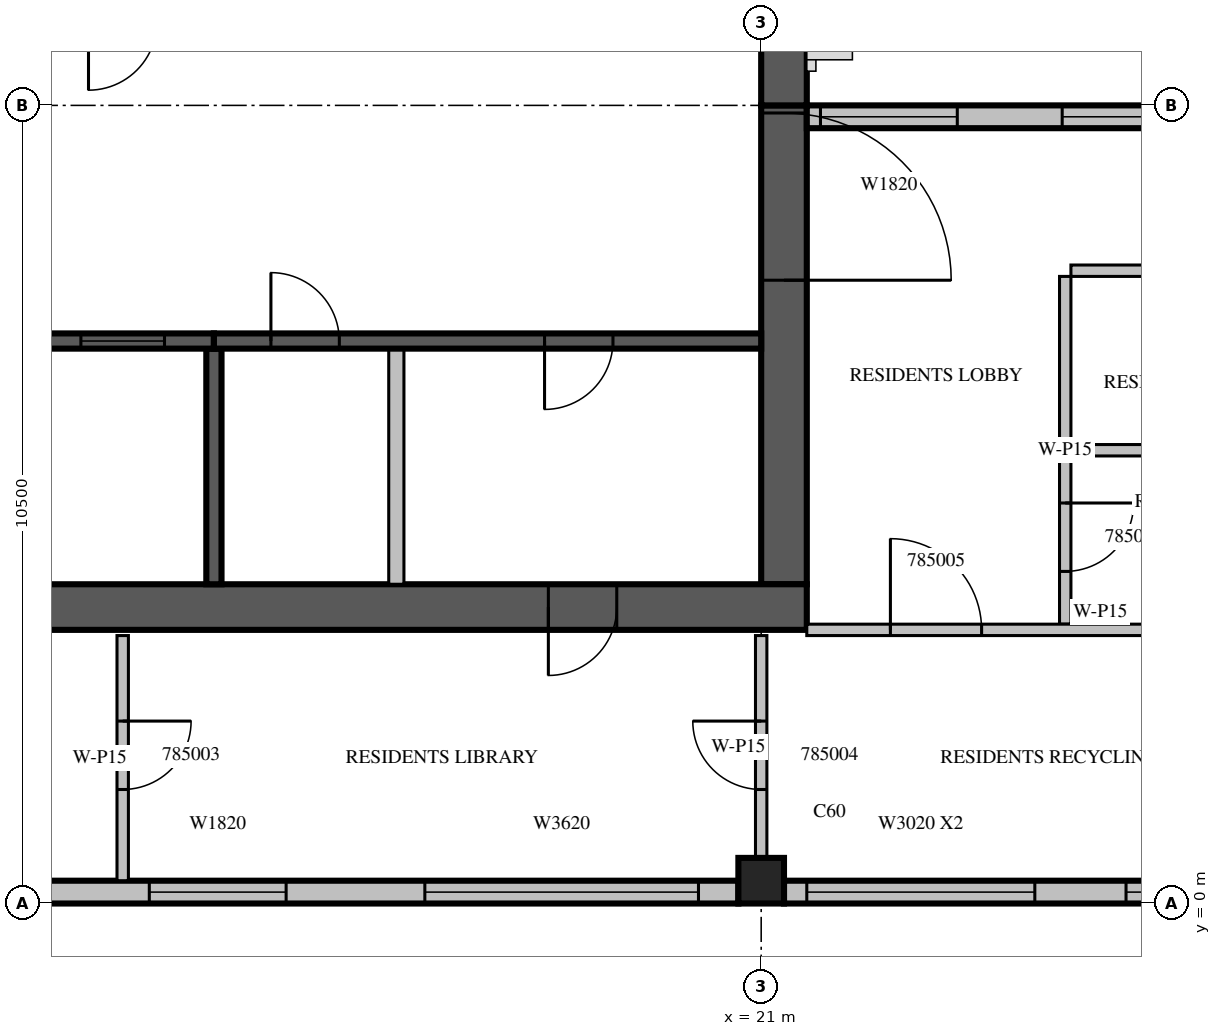
"""IFC4 building model, lengths in metres.
Left out: names, types, materials, properties, quantities, classifications, styles, units other than length and angle.
Written with IfcOpenShell. Run it as: python <this file> out.ifc"""

import sys

from ifc_helpers import new_model, si_unit, direction, frame, frame_2d, origin, origin_2d, place, context, subcontext, project, spatial, rectangle, extrude, source, transform, mapped, element, fill, save


model = new_model("IFC4")
c1 = context("Model", 3, precision=1e-05, world=origin(), true_north=direction((0.0, 1.0)))
c2 = subcontext(c1, "Body", "Model", "MODEL_VIEW")
j1 = project(units=[si_unit("LENGTHUNIT", "METRE"), si_unit("PLANEANGLEUNIT", "RADIAN")], contexts=[c1])
p1 = place(None, origin())
s1 = spatial("IfcSite", under=j1, at=p1, CompositionType="ELEMENT")
p2 = place(p1, origin())
s2 = spatial("IfcBuilding", under=s1, at=p2, CompositionType="ELEMENT")
p3 = place(p2, frame((0.0, 0.0, 358.0)))
s3 = spatial("IfcBuildingStorey", under=s2, at=p3, CompositionType="ELEMENT", Elevation=358.0)
m1 = source(origin(), c2, "Body", "SweptSolid", [
    extrude(rectangle(XDim=0.6, YDim=0.6, at=origin_2d()), origin(), (0.0, 0.0, 1.0), 3.5),
])
p4 = place(p3, frame((21.0, 0.3, 0.0), z_axis=(0.0, 0.0, 1.0), x_axis=(1.0, 0.0, 0.0)))
e1 = element("IfcColumn", 1, at=p4, inside=s3, PredefinedType="COLUMN", context=c2, shape_type="MappedRepresentation", body=[
    mapped(m1, transform((0.0, 0.0, 0.0), scale=1.0)),
])
m2 = source(origin(), c2, "Body", "SweptSolid", [
    extrude(rectangle(XDim=6.3, YDim=0.6, at=frame_2d((3.15, 0.0))), origin(), (0.0, 0.0, 1.0), 3.5),
])
p5 = place(p3, frame((21.3, 4.2, 0.0), z_axis=(0.0, 0.0, 1.0), x_axis=(0.0, 1.0, 0.0)))
e2 = element("IfcWall", 2, at=p5, inside=s3, PredefinedType="SHEAR", context=c2, shape_type="MappedRepresentation", body=[
    mapped(m2, transform((0.0, 0.0, 0.0), scale=1.0)),
])
m3 = source(origin(), c2, "Body", "SweptSolid", [
    extrude(rectangle(XDim=2.2, YDim=2.1, at=frame_2d((1.1, 1.05))), frame((0.0, 0.31, 0.0), z_axis=(0.0, -1.0, 0.0), x_axis=(1.0, 0.0, 0.0)), (0.0, 0.0, 1.0), 0.62),
])
p6 = place(p5, frame((4.0, 0.0, 0.0)))
e3 = element("IfcOpeningElement", 3, at=p6, cuts=e2, PredefinedType="OPENING", context=c2, shape_type="MappedRepresentation", body=[
    mapped(m3, transform((0.0, 0.0, 0.0), scale=1.0)),
])
m4 = source(origin(), c2, "Body", "SweptSolid", [
    extrude(rectangle(XDim=17.4, YDim=0.6, at=frame_2d((8.7, 0.0))), origin(), (0.0, 0.0, 1.0), 3.5),
])
p7 = place(p3, frame((4.2, 3.9, 0.0), z_axis=(0.0, 0.0, 1.0), x_axis=(1.0, 0.0, 0.0)))
e4 = element("IfcWall", 4, at=p7, inside=s3, PredefinedType="SHEAR", context=c2, shape_type="MappedRepresentation", body=[
    mapped(m4, transform((0.0, 0.0, 0.0), scale=1.0)),
])
m5 = source(origin(), c2, "Body", "SweptSolid", [
    extrude(rectangle(XDim=0.9, YDim=2.1, at=frame_2d((0.45, 1.05))), frame((0.0, 0.31, 0.0), z_axis=(0.0, -1.0, 0.0), x_axis=(1.0, 0.0, 0.0)), (0.0, 0.0, 1.0), 0.62),
])
p8 = place(p7, frame((14.0, 0.0, 0.0)))
e5 = element("IfcOpeningElement", 5, at=p8, cuts=e4, PredefinedType="OPENING", context=c2, shape_type="MappedRepresentation", body=[
    mapped(m5, transform((0.0, 0.0, 0.0), scale=1.0)),
])
m6 = source(origin(), c2, "Body", "SweptSolid", [
    extrude(rectangle(XDim=10.5, YDim=0.6, at=frame_2d((5.25, 0.0))), origin(), (0.0, 0.0, 1.0), 3.5),
])
p9 = place(p3, frame((21.3, 10.5, 0.0), z_axis=(0.0, 0.0, 1.0), x_axis=(0.0, 1.0, 0.0)))
e6 = element("IfcWall", 6, at=p9, inside=s3, PredefinedType="SHEAR", context=c2, shape_type="MappedRepresentation", body=[
    mapped(m6, transform((0.0, 0.0, 0.0), scale=1.0)),
])
m7 = source(origin(), c2, "Body", "SweptSolid", [
    extrude(rectangle(XDim=1.2, YDim=2.4, at=frame_2d((0.6, 1.2))), frame((0.0, 0.31, 0.0), z_axis=(0.0, -1.0, 0.0), x_axis=(1.0, 0.0, 0.0)), (0.0, 0.0, 1.0), 0.62),
])
p10 = place(p9, frame((5.7, 0.0, 0.6)))
e7 = element("IfcOpeningElement", 7, at=p10, cuts=e6, PredefinedType="OPENING", context=c2, shape_type="MappedRepresentation", body=[
    mapped(m7, transform((0.0, 0.0, 0.0), scale=1.0)),
])
m8 = source(origin(), c2, "Body", "SweptSolid", [
    extrude(rectangle(XDim=9.9, YDim=0.3, at=frame_2d((4.95, 0.0))), origin(), (0.0, 0.0, 1.0), 3.1),
])
p11 = place(p3, frame((10.8, 0.15, 0.0), z_axis=(0.0, 0.0, 1.0), x_axis=(1.0, 0.0, 0.0)))
e8 = element("IfcWall", 8, at=p11, inside=s3, PredefinedType="STANDARD", context=c2, shape_type="MappedRepresentation", body=[
    mapped(m8, transform((0.0, 0.0, 0.0), scale=1.0)),
])
m9 = source(origin(), c2, "Body", "SweptSolid", [
    extrude(rectangle(XDim=1.8, YDim=2.0, at=frame_2d((0.9, 1.0))), frame((0.0, 0.16, 0.0), z_axis=(0.0, -1.0, 0.0), x_axis=(1.0, 0.0, 0.0)), (0.0, 0.0, 1.0), 0.32),
])
p12 = place(p11, frame((2.15, 0.0, 0.6)))
e9 = element("IfcOpeningElement", 9, at=p12, cuts=e8, PredefinedType="OPENING", context=c2, shape_type="MappedRepresentation", body=[
    mapped(m9, transform((0.0, 0.0, 0.0), scale=1.0)),
])
m10 = source(origin(), c2, "Body", "SweptSolid", [
    extrude(rectangle(XDim=3.6, YDim=2.0, at=frame_2d((1.8, 1.0))), frame((0.0, 0.16, 0.0), z_axis=(0.0, -1.0, 0.0), x_axis=(1.0, 0.0, 0.0)), (0.0, 0.0, 1.0), 0.32),
])
p13 = place(p11, frame((5.775, 0.0, 0.6)))
e10 = element("IfcOpeningElement", 10, at=p13, cuts=e8, PredefinedType="OPENING", context=c2, shape_type="MappedRepresentation", body=[
    mapped(m10, transform((0.0, 0.0, 0.0), scale=1.0)),
])
m11 = source(origin(), c2, "Body", "SweptSolid", [
    extrude(rectangle(XDim=7.8, YDim=0.3, at=frame_2d((3.9, 0.0))), origin(), (0.0, 0.0, 1.0), 3.1),
])
p14 = place(p3, frame((21.3, 0.15, 0.0), z_axis=(0.0, 0.0, 1.0), x_axis=(1.0, 0.0, 0.0)))
e11 = element("IfcWall", 11, at=p14, inside=s3, PredefinedType="STANDARD", context=c2, shape_type="MappedRepresentation", body=[
    mapped(m11, transform((0.0, 0.0, 0.0), scale=1.0)),
])
m12 = source(origin(), c2, "Body", "SweptSolid", [
    extrude(rectangle(XDim=3.0, YDim=2.0, at=frame_2d((1.5, 1.0))), frame((0.0, 0.16, 0.0), z_axis=(0.0, -1.0, 0.0), x_axis=(1.0, 0.0, 0.0)), (0.0, 0.0, 1.0), 0.32),
])
p15 = place(p14, frame((0.3, 0.0, 0.6)))
e12 = element("IfcOpeningElement", 12, at=p15, cuts=e11, PredefinedType="OPENING", context=c2, shape_type="MappedRepresentation", body=[
    mapped(m12, transform((0.0, 0.0, 0.0), scale=1.0)),
])
p16 = place(p14, frame((4.5, 0.0, 0.6)))
e13 = element("IfcOpeningElement", 13, at=p16, cuts=e11, PredefinedType="OPENING", context=c2, shape_type="MappedRepresentation", body=[
    mapped(m12, transform((0.0, 0.0, 0.0), scale=1.0)),
])
m13 = source(origin(), c2, "Body", "SweptSolid", [
    extrude(rectangle(XDim=7.5, YDim=0.3, at=frame_2d((3.75, 0.0))), origin(), (0.0, 0.0, 1.0), 3.1),
])
p17 = place(p3, frame((29.1, 10.35, 0.0), z_axis=(0.0, 0.0, 1.0), x_axis=(-1.0, 0.0, 0.0)))
e14 = element("IfcWall", 14, at=p17, inside=s3, PredefinedType="STANDARD", context=c2, shape_type="MappedRepresentation", body=[
    mapped(m13, transform((0.0, 0.0, 0.0), scale=1.0)),
])
p18 = place(p17, frame((1.14, 0.0, 0.6)))
e15 = element("IfcOpeningElement", 15, at=p18, cuts=e14, PredefinedType="OPENING", context=c2, shape_type="MappedRepresentation", body=[
    mapped(m12, transform((0.0, 0.0, 0.0), scale=1.0)),
])
p19 = place(p17, frame((5.52, 0.0, 0.6)))
e16 = element("IfcOpeningElement", 16, at=p19, cuts=e14, PredefinedType="OPENING", context=c2, shape_type="MappedRepresentation", body=[
    mapped(m9, transform((0.0, 0.0, 0.0), scale=1.0)),
])
m14 = source(origin(), c2, "Body", "SweptSolid", [
    extrude(rectangle(XDim=3.1, YDim=0.2, at=frame_2d((1.55, 0.0))), origin(), (0.0, 0.0, 1.0), 3.1),
])
p20 = place(p3, frame((13.8, 4.2, 0.0), z_axis=(0.0, 0.0, 1.0), x_axis=(0.0, 1.0, 0.0)))
e17 = element("IfcWall", 17, at=p20, inside=s3, PredefinedType="SOLIDWALL", context=c2, shape_type="MappedRepresentation", body=[
    mapped(m14, transform((0.0, 0.0, 0.0), scale=1.0)),
])
m15 = source(origin(), c2, "Body", "SweptSolid", [
    extrude(rectangle(XDim=3.1, YDim=0.2, at=frame_2d((1.55, 0.0))), origin(), (0.0, 0.0, 1.0), 3.1),
])
p21 = place(p3, frame((16.2, 4.2, 0.0), z_axis=(0.0, 0.0, 1.0), x_axis=(0.0, 1.0, 0.0)))
e18 = element("IfcWall", 18, at=p21, inside=s3, PredefinedType="PARTITIONING", context=c2, shape_type="MappedRepresentation", body=[
    mapped(m15, transform((0.0, 0.0, 0.0), scale=1.0)),
])
m16 = source(origin(), c2, "Body", "SweptSolid", [
    extrude(rectangle(XDim=9.6, YDim=0.2, at=frame_2d((4.8, 0.0))), origin(), (0.0, 0.0, 1.0), 3.5),
])
p22 = place(p3, frame((4.2, 7.4, 0.0), z_axis=(0.0, 0.0, 1.0), x_axis=(1.0, 0.0, 0.0)))
e19 = element("IfcWall", 19, at=p22, inside=s3, PredefinedType="SOLIDWALL", context=c2, shape_type="MappedRepresentation", body=[
    mapped(m16, transform((0.0, 0.0, 0.0), scale=1.0)),
])
m17 = source(origin(), c2, "Body", "SweptSolid", [
    extrude(rectangle(XDim=1.1, YDim=2.1, at=frame_2d((0.55, 1.05))), frame((0.0, 0.11, 0.0), z_axis=(0.0, -1.0, 0.0), x_axis=(1.0, 0.0, 0.0)), (0.0, 0.0, 1.0), 0.22),
])
p23 = place(p22, frame((0.65, 0.0, 0.0)))
e20 = element("IfcOpeningElement", 20, at=p23, cuts=e19, PredefinedType="OPENING", context=c2, shape_type="MappedRepresentation", body=[
    mapped(m17, transform((0.0, 0.0, 0.0), scale=1.0)),
])
p24 = place(p22, frame((3.05, 0.0, 0.0)))
e21 = element("IfcOpeningElement", 21, at=p24, cuts=e19, PredefinedType="OPENING", context=c2, shape_type="MappedRepresentation", body=[
    mapped(m17, transform((0.0, 0.0, 0.0), scale=1.0)),
])
p25 = place(p22, frame((5.45, 0.0, 0.0)))
e22 = element("IfcOpeningElement", 22, at=p25, cuts=e19, PredefinedType="OPENING", context=c2, shape_type="MappedRepresentation", body=[
    mapped(m17, transform((0.0, 0.0, 0.0), scale=1.0)),
])
p26 = place(p22, frame((7.85, 0.0, 0.0)))
e23 = element("IfcOpeningElement", 23, at=p26, cuts=e19, PredefinedType="OPENING", context=c2, shape_type="MappedRepresentation", body=[
    mapped(m17, transform((0.0, 0.0, 0.0), scale=1.0)),
])
m18 = source(origin(), c2, "Body", "SweptSolid", [
    extrude(rectangle(XDim=7.2, YDim=0.2, at=frame_2d((3.6, 0.0))), origin(), (0.0, 0.0, 1.0), 3.1),
])
p27 = place(p3, frame((13.8, 7.4, 0.0), z_axis=(0.0, 0.0, 1.0), x_axis=(1.0, 0.0, 0.0)))
e24 = element("IfcWall", 24, at=p27, inside=s3, PredefinedType="SOLIDWALL", context=c2, shape_type="MappedRepresentation", body=[
    mapped(m18, transform((0.0, 0.0, 0.0), scale=1.0)),
])
m19 = source(origin(), c2, "Body", "SweptSolid", [
    extrude(rectangle(XDim=0.9, YDim=2.1, at=frame_2d((0.45, 1.05))), frame((0.0, 0.11, 0.0), z_axis=(0.0, -1.0, 0.0), x_axis=(1.0, 0.0, 0.0)), (0.0, 0.0, 1.0), 0.22),
])
p28 = place(p27, frame((0.75, 0.0, 0.0)))
e25 = element("IfcOpeningElement", 25, at=p28, cuts=e24, PredefinedType="OPENING", context=c2, shape_type="MappedRepresentation", body=[
    mapped(m19, transform((0.0, 0.0, 0.0), scale=1.0)),
])
p29 = place(p27, frame((4.35, 0.0, 0.0)))
e26 = element("IfcOpeningElement", 26, at=p29, cuts=e24, PredefinedType="OPENING", context=c2, shape_type="MappedRepresentation", body=[
    mapped(m19, transform((0.0, 0.0, 0.0), scale=1.0)),
])
m20 = source(origin(), c2, "Body", "SweptSolid", [
    extrude(rectangle(XDim=4.575, YDim=0.15, at=frame_2d((2.288, 0.0))), origin(), (0.0, 0.0, 1.0), 3.1),
])
p30 = place(p3, frame((25.0, 8.25, 0.0), z_axis=(0.0, 0.0, 1.0), x_axis=(0.0, -1.0, 0.0)))
e27 = element("IfcWall", 27, at=p30, inside=s3, PredefinedType="PARTITIONING", context=c2, shape_type="MappedRepresentation", body=[
    mapped(m20, transform((0.0, 0.0, 0.0), scale=1.0)),
])
m21 = source(origin(), c2, "Body", "SweptSolid", [
    extrude(rectangle(XDim=0.9, YDim=2.1, at=frame_2d((0.45, 1.05))), frame((0.0, 0.085, 0.0), z_axis=(0.0, -1.0, 0.0), x_axis=(1.0, 0.0, 0.0)), (0.0, 0.0, 1.0), 0.17),
])
p31 = place(p30, frame((2.981, 0.0, 0.0)))
e28 = element("IfcOpeningElement", 28, at=p31, cuts=e27, PredefinedType="OPENING", context=c2, shape_type="MappedRepresentation", body=[
    mapped(m21, transform((0.0, 0.0, 0.0), scale=1.0)),
])
m22 = source(origin(), c2, "Body", "SweptSolid", [
    extrude(rectangle(XDim=4.25, YDim=0.15, at=frame_2d((2.125, 0.0))), origin(), (0.0, 0.0, 1.0), 3.1),
])
p32 = place(p3, frame((29.325, 8.325, 0.0), z_axis=(0.0, 0.0, 1.0), x_axis=(-1.0, 0.0, 0.0)))
e29 = element("IfcWall", 29, at=p32, inside=s3, PredefinedType="PARTITIONING", context=c2, shape_type="MappedRepresentation", body=[
    mapped(m22, transform((0.0, 0.0, 0.0), scale=1.0)),
])
m23 = source(origin(), c2, "Body", "SweptSolid", [
    extrude(rectangle(XDim=1.0, YDim=2.1, at=frame_2d((0.5, 1.05))), frame((0.0, 0.085, 0.0), z_axis=(0.0, -1.0, 0.0), x_axis=(1.0, 0.0, 0.0)), (0.0, 0.0, 1.0), 0.17),
])
p33 = place(p32, frame((1.625, 0.0, 0.0)))
e30 = element("IfcOpeningElement", 30, at=p33, cuts=e29, PredefinedType="OPENING", context=c2, shape_type="MappedRepresentation", body=[
    mapped(m23, transform((0.0, 0.0, 0.0), scale=1.0)),
])
p34 = place(p3, frame((29.325, 5.963, 0.0), z_axis=(0.0, 0.0, 1.0), x_axis=(-1.0, 0.0, 0.0)))
e31 = element("IfcWall", 31, at=p34, inside=s3, PredefinedType="PARTITIONING", context=c2, shape_type="MappedRepresentation", body=[
    mapped(m22, transform((0.0, 0.0, 0.0), scale=1.0)),
])
m24 = source(origin(), c2, "Body", "SweptSolid", [
    extrude(rectangle(XDim=3.225, YDim=0.15, at=frame_2d((1.613, 0.0))), origin(), (0.0, 0.0, 1.0), 3.1),
])
p35 = place(p3, frame((12.6, 3.525, 0.0), z_axis=(0.0, 0.0, 1.0), x_axis=(0.0, -1.0, 0.0)))
e32 = element("IfcWall", 32, at=p35, inside=s3, PredefinedType="PARTITIONING", context=c2, shape_type="MappedRepresentation", body=[
    mapped(m24, transform((0.0, 0.0, 0.0), scale=1.0)),
])
p36 = place(p35, frame((1.125, 0.0, 0.0)))
e33 = element("IfcOpeningElement", 33, at=p36, cuts=e32, PredefinedType="OPENING", context=c2, shape_type="MappedRepresentation", body=[
    mapped(m21, transform((0.0, 0.0, 0.0), scale=1.0)),
])
p37 = place(p3, frame((21.0, 3.525, 0.0), z_axis=(0.0, 0.0, 1.0), x_axis=(0.0, -1.0, 0.0)))
e34 = element("IfcWall", 34, at=p37, inside=s3, PredefinedType="PARTITIONING", context=c2, shape_type="SweptSolid", body=[
    extrude(rectangle(XDim=2.926, YDim=0.15, at=frame_2d((1.463, 0.0))), origin(), (0.0, 0.0, 1.0), 3.1),
])
p38 = place(p37, frame((1.125, 0.0, 0.0)))
e35 = element("IfcOpeningElement", 35, at=p38, cuts=e34, PredefinedType="OPENING", context=c2, shape_type="MappedRepresentation", body=[
    mapped(m21, transform((0.0, 0.0, 0.0), scale=1.0)),
])
m25 = source(origin(), c2, "Body", "SweptSolid", [
    extrude(rectangle(XDim=7.725, YDim=0.15, at=frame_2d((3.862, 0.0))), origin(), (0.0, 0.0, 1.0), 3.1),
])
p39 = place(p3, frame((21.6, 3.6, 0.0), z_axis=(0.0, 0.0, 1.0), x_axis=(1.0, 0.0, 0.0)))
e36 = element("IfcWall", 36, at=p39, inside=s3, PredefinedType="PARTITIONING", context=c2, shape_type="MappedRepresentation", body=[
    mapped(m25, transform((0.0, 0.0, 0.0), scale=1.0)),
])
m26 = source(origin(), c2, "Body", "SweptSolid", [
    extrude(rectangle(XDim=1.2, YDim=2.1, at=frame_2d((0.6, 1.05))), frame((0.0, 0.085, 0.0), z_axis=(0.0, -1.0, 0.0), x_axis=(1.0, 0.0, 0.0)), (0.0, 0.0, 1.0), 0.17),
])
p40 = place(p39, frame((1.1, 0.0, 0.0)))
e37 = element("IfcOpeningElement", 37, at=p40, cuts=e36, PredefinedType="OPENING", context=c2, shape_type="MappedRepresentation", body=[
    mapped(m26, transform((0.0, 0.0, 0.0), scale=1.0)),
])
m27 = source(origin(), c2, "Body", "SweptSolid", [
    extrude(rectangle(XDim=1.8, YDim=2.0, at=frame_2d((0.9, 1.0))), frame((0.0, 0.03, 0.0), z_axis=(0.0, -1.0, 0.0), x_axis=(1.0, 0.0, 0.0)), (0.0, 0.0, 1.0), 0.06),
])
p41 = place(p12, origin())
e38 = element("IfcWindow", 38, at=p41, inside=s3, PartitioningType="SINGLE_PANEL", PredefinedType="WINDOW", context=c2, shape_type="MappedRepresentation", body=[
    mapped(m27, transform((0.0, 0.0, 0.0), scale=1.0)),
])
fill(e9, e38)
m28 = source(origin(), c2, "Body", "SweptSolid", [
    extrude(rectangle(XDim=3.6, YDim=2.0, at=frame_2d((1.8, 1.0))), frame((0.0, 0.03, 0.0), z_axis=(0.0, -1.0, 0.0), x_axis=(1.0, 0.0, 0.0)), (0.0, 0.0, 1.0), 0.06),
])
p42 = place(p13, origin())
e39 = element("IfcWindow", 39, at=p42, inside=s3, PartitioningType="SINGLE_PANEL", PredefinedType="WINDOW", context=c2, shape_type="MappedRepresentation", body=[
    mapped(m28, transform((0.0, 0.0, 0.0), scale=1.0)),
])
fill(e10, e39)
m29 = source(origin(), c2, "Body", "SweptSolid", [
    extrude(rectangle(XDim=3.0, YDim=2.0, at=frame_2d((1.5, 1.0))), frame((0.0, 0.03, 0.0), z_axis=(0.0, -1.0, 0.0), x_axis=(1.0, 0.0, 0.0)), (0.0, 0.0, 1.0), 0.06),
])
p43 = place(p15, origin())
e40 = element("IfcWindow", 40, at=p43, inside=s3, PartitioningType="SINGLE_PANEL", PredefinedType="WINDOW", context=c2, shape_type="MappedRepresentation", body=[
    mapped(m29, transform((0.0, 0.0, 0.0), scale=1.0)),
])
fill(e12, e40)
p44 = place(p16, origin())
e41 = element("IfcWindow", 41, at=p44, inside=s3, PartitioningType="SINGLE_PANEL", PredefinedType="WINDOW", context=c2, shape_type="MappedRepresentation", body=[
    mapped(m29, transform((0.0, 0.0, 0.0), scale=1.0)),
])
fill(e13, e41)
p45 = place(p18, origin())
e42 = element("IfcWindow", 42, at=p45, inside=s3, PartitioningType="SINGLE_PANEL", PredefinedType="WINDOW", context=c2, shape_type="MappedRepresentation", body=[
    mapped(m29, transform((0.0, 0.0, 0.0), scale=1.0)),
])
fill(e15, e42)
p46 = place(p19, origin())
e43 = element("IfcWindow", 43, at=p46, inside=s3, PartitioningType="SINGLE_PANEL", PredefinedType="WINDOW", context=c2, shape_type="MappedRepresentation", body=[
    mapped(m27, transform((0.0, 0.0, 0.0), scale=1.0)),
])
fill(e16, e43)
m30 = source(origin(), c2, "Body", "SweptSolid", [
    extrude(rectangle(XDim=1.1, YDim=2.1, at=frame_2d((0.55, 1.05))), frame((0.0, 0.025, 0.0), z_axis=(0.0, -1.0, 0.0), x_axis=(1.0, 0.0, 0.0)), (0.0, 0.0, 1.0), 0.05),
])
p47 = place(p26, origin())
e44 = element("IfcDoor", 44, at=p47, inside=s3, OperationType="SLIDING_TO_LEFT", PredefinedType="DOOR", context=c2, shape_type="MappedRepresentation", body=[
    mapped(m30, transform((0.0, 0.0, 0.0), scale=1.0)),
])
fill(e23, e44)
m31 = source(origin(), c2, "Body", "SweptSolid", [
    extrude(rectangle(XDim=0.9, YDim=2.1, at=frame_2d((0.45, 1.05))), frame((0.0, 0.025, 0.0), z_axis=(0.0, -1.0, 0.0), x_axis=(1.0, 0.0, 0.0)), (0.0, 0.0, 1.0), 0.05),
])
p48 = place(p28, origin())
e45 = element("IfcDoor", 45, at=p48, inside=s3, OperationType="SINGLE_SWING_LEFT", PredefinedType="DOOR", context=c2, shape_type="MappedRepresentation", body=[
    mapped(m31, transform((0.0, 0.0, 0.0), scale=1.0)),
])
fill(e25, e45)
p49 = place(p29, origin())
e46 = element("IfcDoor", 46, at=p49, inside=s3, OperationType="SINGLE_SWING_RIGHT", PredefinedType="DOOR", context=c2, shape_type="MappedRepresentation", body=[
    mapped(m31, transform((0.0, 0.0, 0.0), scale=1.0)),
])
fill(e26, e46)
m32 = source(origin(), c2, "Body", "SweptSolid", [
    extrude(rectangle(XDim=2.2, YDim=2.1, at=frame_2d((1.1, 1.05))), frame((0.0, 0.025, 0.0), z_axis=(0.0, -1.0, 0.0), x_axis=(1.0, 0.0, 0.0)), (0.0, 0.0, 1.0), 0.05),
])
p50 = place(p6, origin())
e47 = element("IfcDoor", 47, at=p50, inside=s3, OperationType="DOUBLE_DOOR_SINGLE_SWING", PredefinedType="DOOR", context=c2, shape_type="MappedRepresentation", body=[
    mapped(m32, transform((0.0, 0.0, 0.0), scale=1.0)),
])
fill(e3, e47)
p51 = place(p8, origin())
e48 = element("IfcDoor", 48, at=p51, inside=s3, OperationType="SINGLE_SWING_RIGHT", PredefinedType="DOOR", context=c2, shape_type="MappedRepresentation", body=[
    mapped(m31, transform((0.0, 0.0, 0.0), scale=1.0)),
])
fill(e5, e48)
p52 = place(p31, origin())
e49 = element("IfcDoor", 49, at=p52, inside=s3, OperationType="SINGLE_SWING_LEFT", PredefinedType="DOOR", context=c2, shape_type="MappedRepresentation", body=[
    mapped(m31, transform((0.0, 0.0, 0.0), scale=1.0)),
])
fill(e28, e49)
p53 = place(p36, origin())
e50 = element("IfcDoor", 50, at=p53, inside=s3, OperationType="SINGLE_SWING_LEFT", PredefinedType="DOOR", context=c2, shape_type="MappedRepresentation", body=[
    mapped(m31, transform((0.0, 0.0, 0.0), scale=1.0)),
])
fill(e33, e50)
p54 = place(p38, origin())
e51 = element("IfcDoor", 51, at=p54, inside=s3, OperationType="SINGLE_SWING_RIGHT", PredefinedType="DOOR", context=c2, shape_type="MappedRepresentation", body=[
    mapped(m31, transform((0.0, 0.0, 0.0), scale=1.0)),
])
fill(e35, e51)
m33 = source(origin(), c2, "Body", "SweptSolid", [
    extrude(rectangle(XDim=1.2, YDim=2.1, at=frame_2d((0.6, 1.05))), frame((0.0, 0.025, 0.0), z_axis=(0.0, -1.0, 0.0), x_axis=(1.0, 0.0, 0.0)), (0.0, 0.0, 1.0), 0.05),
])
p55 = place(p40, origin())
e52 = element("IfcDoor", 52, at=p55, inside=s3, OperationType="SINGLE_SWING_LEFT", PredefinedType="DOOR", context=c2, shape_type="MappedRepresentation", body=[
    mapped(m33, transform((0.0, 0.0, 0.0), scale=1.0)),
])
fill(e37, e52)
save(model, sys.argv[1])
